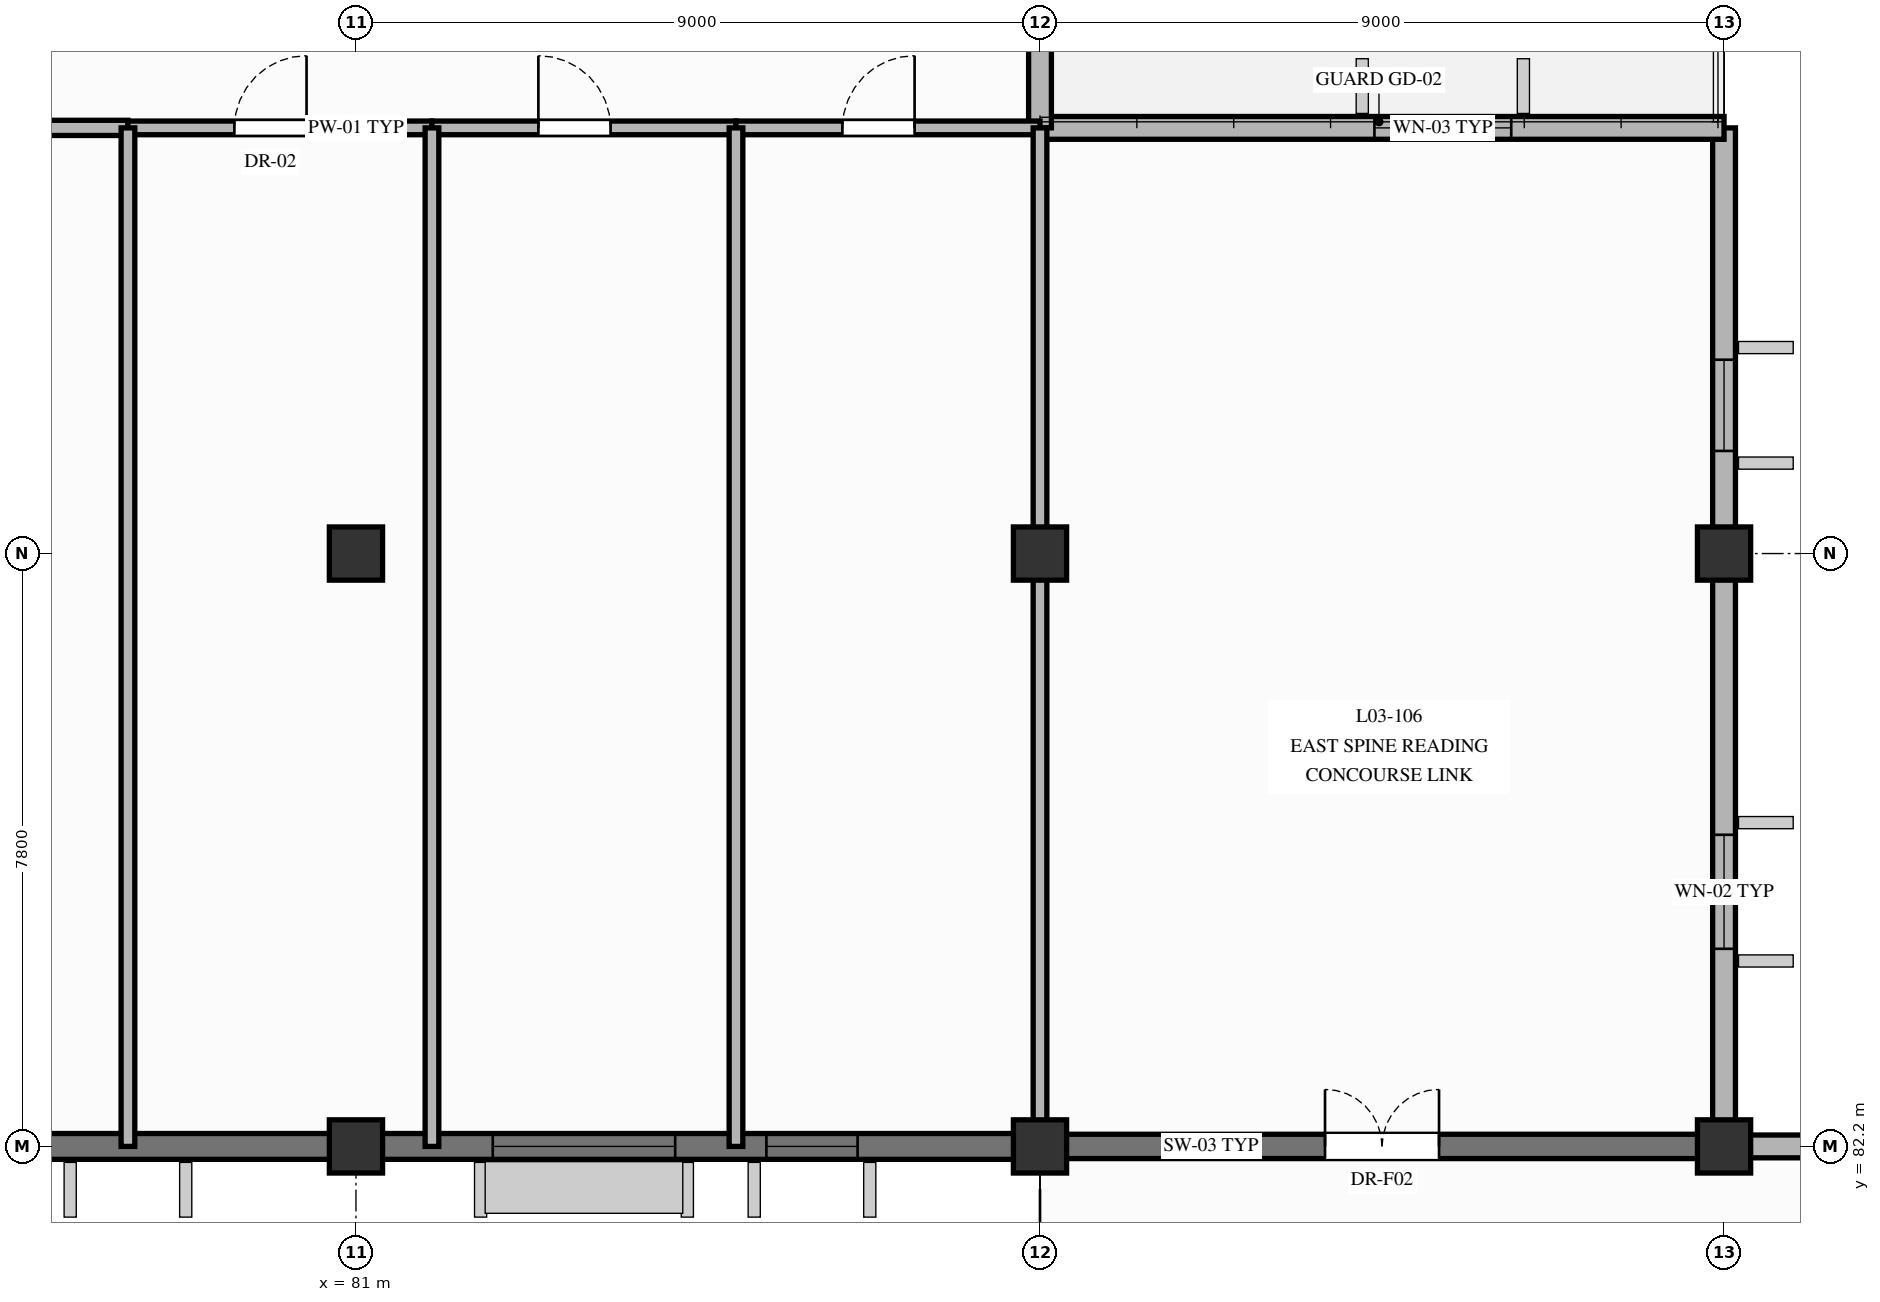
"""IFC4 building model, lengths in metres.
Left out: names, types, materials, properties, quantities, classifications, styles, units other than length and angle.
Written with IfcOpenShell. Run it as: python <this file> out.ifc"""

import sys

from ifc_helpers import new_model, si_unit, direction, frame, frame_2d, origin, origin_2d, place, context, subcontext, project, spatial, rectangle, extrude, element, fill, save


model = new_model("IFC4")
c1 = context("Model", 3, precision=1e-05, world=origin(), true_north=direction((0.0, 1.0)))
c2 = subcontext(c1, "Body", "Model", "MODEL_VIEW")
j1 = project(units=[si_unit("LENGTHUNIT", "METRE"), si_unit("PLANEANGLEUNIT", "RADIAN")], contexts=[c1])
p1 = place(None, origin())
s1 = spatial("IfcSite", under=j1, at=p1, CompositionType="ELEMENT")
p2 = place(p1, origin())
s2 = spatial("IfcBuilding", under=s1, at=p2, CompositionType="ELEMENT")
p3 = place(p2, frame((0.0, 0.0, 12.78)))
s3 = spatial("IfcBuildingStorey", under=s2, at=p3, CompositionType="ELEMENT", Elevation=12.78)
for number, where, z_axis, x_axis in (
    (1, (81.0, 82.2, 0.0), (0.0, 0.0, 1.0), (1.0, 0.0, 0.0)),
    (2, (81.0, 90.0, 0.0), (0.0, 0.0, 1.0), (1.0, 0.0, 0.0)),
    (3, (90.0, 82.2, 0.0), (0.0, 0.0, 1.0), (1.0, 0.0, 0.0)),
    (4, (90.0, 90.0, 0.0), (0.0, 0.0, 1.0), (1.0, 0.0, 0.0)),
    (5, (99.0, 82.2, 0.0), (0.0, 0.0, 1.0), (1.0, 0.0, 0.0)),
    (6, (99.0, 90.0, 0.0), (0.0, 0.0, 1.0), (1.0, 0.0, 0.0)),
):
    element("IfcColumn", number, at=place(p3, frame(where, z_axis=z_axis, x_axis=x_axis)), inside=s3, PredefinedType="COLUMN", context=c2, shape_type="SweptSolid", body=[
        extrude(rectangle(XDim=0.7, YDim=0.7, at=origin_2d()), origin(), (0.0, 0.0, 1.0), 3.74),
    ])
p4 = place(p3, frame((72.0, 82.2, 0.0), z_axis=(0.0, 0.0, 1.0), x_axis=(1.0, 0.0, 0.0)))
e7 = element("IfcWall", 7, at=p4, inside=s3, PredefinedType="SOLIDWALL", context=c2, shape_type="SweptSolid", body=[
    extrude(rectangle(XDim=9.0, YDim=0.34, at=frame_2d((4.5, 0.0))), origin(), (0.0, 0.0, 1.0), 3.42),
])
p5 = place(p4, frame((1.8, 0.0, 0.85)))
e8 = element("IfcOpeningElement", 8, at=p5, cuts=e7, PredefinedType="OPENING", context=c2, shape_type="SweptSolid", body=[
    extrude(rectangle(XDim=2.4, YDim=1.1, at=frame_2d((1.2, 0.55))), frame((0.0, 0.18, 0.0), z_axis=(0.0, -1.0, 0.0), x_axis=(1.0, 0.0, 0.0)), (0.0, 0.0, 1.0), 0.36),
])
p6 = place(p3, frame((81.0, 82.2, 0.0), z_axis=(0.0, 0.0, 1.0), x_axis=(1.0, 0.0, 0.0)))
e9 = element("IfcWall", 9, at=p6, inside=s3, PredefinedType="SOLIDWALL", context=c2, shape_type="SweptSolid", body=[
    extrude(rectangle(XDim=9.0, YDim=0.34, at=frame_2d((4.5, 0.0))), origin(), (0.0, 0.0, 1.0), 3.42),
])
p7 = place(p6, frame((1.8, 0.0, 0.85)))
e10 = element("IfcOpeningElement", 10, at=p7, cuts=e9, PredefinedType="OPENING", context=c2, shape_type="SweptSolid", body=[
    extrude(rectangle(XDim=2.4, YDim=1.1, at=frame_2d((1.2, 0.55))), frame((0.0, 0.18, 0.0), z_axis=(0.0, -1.0, 0.0), x_axis=(1.0, 0.0, 0.0)), (0.0, 0.0, 1.0), 0.36),
])
p8 = place(p6, frame((5.4, 0.0, 0.665)))
e11 = element("IfcOpeningElement", 11, at=p8, cuts=e9, PredefinedType="OPENING", context=c2, shape_type="SweptSolid", body=[
    extrude(rectangle(XDim=1.2, YDim=2.1, at=frame_2d((0.6, 1.05))), frame((0.0, 0.18, 0.0), z_axis=(0.0, -1.0, 0.0), x_axis=(1.0, 0.0, 0.0)), (0.0, 0.0, 1.0), 0.36),
])
p9 = place(p3, frame((99.0, 82.2, 0.0), z_axis=(0.0, 0.0, 1.0), x_axis=(0.0, 1.0, 0.0)))
e12 = element("IfcWall", 12, at=p9, inside=s3, PredefinedType="SOLIDWALL", context=c2, shape_type="SweptSolid", body=[
    extrude(rectangle(XDim=13.4, YDim=0.3, at=frame_2d((6.7, 0.0))), origin(), (0.0, 0.0, 1.0), 2.685),
])
p10 = place(p9, frame((2.6, 0.0, 0.465)))
e13 = element("IfcOpeningElement", 13, at=p10, cuts=e12, PredefinedType="OPENING", context=c2, shape_type="SweptSolid", body=[
    extrude(rectangle(XDim=1.5, YDim=2.1, at=frame_2d((0.75, 1.05))), frame((0.0, 0.16, 0.0), z_axis=(0.0, -1.0, 0.0), x_axis=(1.0, 0.0, 0.0)), (0.0, 0.0, 1.0), 0.32),
])
p11 = place(p9, frame((9.15, 0.0, 0.465)))
e14 = element("IfcOpeningElement", 14, at=p11, cuts=e12, PredefinedType="OPENING", context=c2, shape_type="SweptSolid", body=[
    extrude(rectangle(XDim=1.2, YDim=2.1, at=frame_2d((0.6, 1.05))), frame((0.0, 0.16, 0.0), z_axis=(0.0, -1.0, 0.0), x_axis=(1.0, 0.0, 0.0)), (0.0, 0.0, 1.0), 0.32),
])
p12 = place(p3, frame((99.0, 95.6, 0.0), z_axis=(0.0, 0.0, 1.0), x_axis=(-1.0, 0.0, 0.0)))
e15 = element("IfcWall", 15, at=p12, inside=s3, PredefinedType="SOLIDWALL", context=c2, shape_type="SweptSolid", body=[
    extrude(rectangle(XDim=9.0, YDim=0.3, at=frame_2d((4.5, 0.0))), origin(), (0.0, 0.0, 1.0), 3.42),
])
p13 = place(p12, frame((2.8, 0.0, 0.95)))
e16 = element("IfcOpeningElement", 16, at=p13, cuts=e15, PredefinedType="OPENING", context=c2, shape_type="SweptSolid", body=[
    extrude(rectangle(XDim=1.8, YDim=2.1, at=frame_2d((0.9, 1.05))), frame((0.0, 0.16, 0.0), z_axis=(0.0, -1.0, 0.0), x_axis=(1.0, 0.0, 0.0)), (0.0, 0.0, 1.0), 0.32),
])
p14 = place(p3, frame((90.0, 95.6, 0.0), z_axis=(0.0, 0.0, 1.0), x_axis=(0.0, 1.0, 0.0)))
e17 = element("IfcWall", 17, at=p14, inside=s3, PredefinedType="SOLIDWALL", context=c2, shape_type="SweptSolid", body=[
    extrude(rectangle(XDim=18.4, YDim=0.3, at=frame_2d((9.2, 0.0))), origin(), (0.0, 0.0, 1.0), 2.805),
])
p15 = place(p14, frame((4.4, 0.0, 0.0)))
e18 = element("IfcOpeningElement", 18, at=p15, cuts=e17, PredefinedType="OPENING", context=c2, shape_type="SweptSolid", body=[
    extrude(rectangle(XDim=1.6, YDim=2.25, at=frame_2d((0.8, 1.125))), frame((0.0, 0.16, 0.0), z_axis=(0.0, -1.0, 0.0), x_axis=(1.0, 0.0, 0.0)), (0.0, 0.0, 1.0), 0.32),
])
p16 = place(p14, frame((12.8, 0.0, 0.935)))
e19 = element("IfcOpeningElement", 19, at=p16, cuts=e17, PredefinedType="OPENING", context=c2, shape_type="SweptSolid", body=[
    extrude(rectangle(XDim=1.05, YDim=1.75, at=frame_2d((0.525, 0.875))), frame((0.0, 0.16, 0.0), z_axis=(0.0, -1.0, 0.0), x_axis=(1.0, 0.0, 0.0)), (0.0, 0.0, 1.0), 0.32),
])
p17 = place(p3, frame((99.0, 82.2, 0.0), z_axis=(0.0, 0.0, 1.0), x_axis=(1.0, 0.0, 0.0)))
e20 = element("IfcWall", 20, at=p17, inside=s3, PredefinedType="SOLIDWALL", context=c2, shape_type="SweptSolid", body=[
    extrude(rectangle(XDim=9.0, YDim=0.3, at=frame_2d((4.5, 0.0))), origin(), (0.0, 0.0, 1.0), 2.853),
])
p18 = place(p17, frame((2.6, 0.0, 0.633)))
e21 = element("IfcOpeningElement", 21, at=p18, cuts=e20, PredefinedType="OPENING", context=c2, shape_type="SweptSolid", body=[
    extrude(rectangle(XDim=1.8, YDim=2.1, at=frame_2d((0.9, 1.05))), frame((0.0, 0.16, 0.0), z_axis=(0.0, -1.0, 0.0), x_axis=(1.0, 0.0, 0.0)), (0.0, 0.0, 1.0), 0.32),
])
p19 = place(p3, frame((90.0, 82.2, 0.0), z_axis=(0.0, 0.0, 1.0), x_axis=(1.0, 0.0, 0.0)))
e22 = element("IfcWall", 22, at=p19, inside=s3, PredefinedType="SHEAR", context=c2, shape_type="SweptSolid", body=[
    extrude(rectangle(XDim=9.0, YDim=0.32, at=frame_2d((4.5, 0.0))), origin(), (0.0, 0.0, 1.0), 3.42),
])
p20 = place(p19, frame((3.75, 0.0, 0.0)))
e23 = element("IfcOpeningElement", 23, at=p20, cuts=e22, PredefinedType="OPENING", context=c2, shape_type="SweptSolid", body=[
    extrude(rectangle(XDim=1.5, YDim=2.2, at=frame_2d((0.75, 1.1))), frame((0.0, 0.17, 0.0), z_axis=(0.0, -1.0, 0.0), x_axis=(1.0, 0.0, 0.0)), (0.0, 0.0, 1.0), 0.34),
])
p21 = place(p3, frame((58.0, 95.6, 0.0), z_axis=(0.0, 0.0, 1.0), x_axis=(1.0, 0.0, 0.0)))
e24 = element("IfcWall", 24, at=p21, inside=s3, PredefinedType="PARTITIONING", context=c2, shape_type="SweptSolid", body=[
    extrude(rectangle(XDim=20.0, YDim=0.2, at=frame_2d((10.0, 0.0))), origin(), (0.0, 0.0, 1.0), 3.42),
])
p22 = place(p21, frame((9.4, 0.0, 0.0)))
e25 = element("IfcOpeningElement", 25, at=p22, cuts=e24, PredefinedType="OPENING", context=c2, shape_type="SweptSolid", body=[
    extrude(rectangle(XDim=1.6, YDim=2.2, at=frame_2d((0.8, 1.1))), frame((0.0, 0.11, 0.0), z_axis=(0.0, -1.0, 0.0), x_axis=(1.0, 0.0, 0.0)), (0.0, 0.0, 1.0), 0.22),
])
p23 = place(p3, frame((78.0, 95.6, 0.0), z_axis=(0.0, 0.0, 1.0), x_axis=(1.0, 0.0, 0.0)))
e26 = element("IfcWall", 26, at=p23, inside=s3, PredefinedType="PLUMBINGWALL", context=c2, shape_type="SweptSolid", body=[
    extrude(rectangle(XDim=4.0, YDim=0.18, at=frame_2d((2.0, 0.0))), origin(), (0.0, 0.0, 1.0), 3.42),
])
p24 = place(p23, frame((1.4, 0.0, 0.0)))
e27 = element("IfcOpeningElement", 27, at=p24, cuts=e26, PredefinedType="OPENING", context=c2, shape_type="SweptSolid", body=[
    extrude(rectangle(XDim=0.95, YDim=2.15, at=frame_2d((0.475, 1.075))), frame((0.0, 0.1, 0.0), z_axis=(0.0, -1.0, 0.0), x_axis=(1.0, 0.0, 0.0)), (0.0, 0.0, 1.0), 0.2),
])
p25 = place(p3, frame((78.0, 82.2, 0.0), z_axis=(0.0, 0.0, 1.0), x_axis=(0.0, 1.0, 0.0)))
e28 = element("IfcWall", 28, at=p25, inside=s3, PredefinedType="PLUMBINGWALL", context=c2, shape_type="SweptSolid", body=[
    extrude(rectangle(XDim=13.4, YDim=0.18, at=frame_2d((6.7, 0.0))), origin(), (0.0, 0.0, 1.0), 3.42),
])
p26 = place(p3, frame((82.0, 95.6, 0.0), z_axis=(0.0, 0.0, 1.0), x_axis=(1.0, 0.0, 0.0)))
e29 = element("IfcWall", 29, at=p26, inside=s3, PredefinedType="PLUMBINGWALL", context=c2, shape_type="SweptSolid", body=[
    extrude(rectangle(XDim=4.0, YDim=0.18, at=frame_2d((2.0, 0.0))), origin(), (0.0, 0.0, 1.0), 3.42),
])
p27 = place(p26, frame((1.4, 0.0, 0.0)))
e30 = element("IfcOpeningElement", 30, at=p27, cuts=e29, PredefinedType="OPENING", context=c2, shape_type="SweptSolid", body=[
    extrude(rectangle(XDim=0.95, YDim=2.15, at=frame_2d((0.475, 1.075))), frame((0.0, 0.1, 0.0), z_axis=(0.0, -1.0, 0.0), x_axis=(1.0, 0.0, 0.0)), (0.0, 0.0, 1.0), 0.2),
])
p28 = place(p3, frame((82.0, 82.2, 0.0), z_axis=(0.0, 0.0, 1.0), x_axis=(0.0, 1.0, 0.0)))
e31 = element("IfcWall", 31, at=p28, inside=s3, PredefinedType="PLUMBINGWALL", context=c2, shape_type="SweptSolid", body=[
    extrude(rectangle(XDim=13.4, YDim=0.18, at=frame_2d((6.7, 0.0))), origin(), (0.0, 0.0, 1.0), 3.42),
])
p29 = place(p3, frame((86.0, 95.6, 0.0), z_axis=(0.0, 0.0, 1.0), x_axis=(1.0, 0.0, 0.0)))
e32 = element("IfcWall", 32, at=p29, inside=s3, PredefinedType="PLUMBINGWALL", context=c2, shape_type="SweptSolid", body=[
    extrude(rectangle(XDim=4.0, YDim=0.18, at=frame_2d((2.0, 0.0))), origin(), (0.0, 0.0, 1.0), 3.42),
])
p30 = place(p29, frame((1.4, 0.0, 0.0)))
e33 = element("IfcOpeningElement", 33, at=p30, cuts=e32, PredefinedType="OPENING", context=c2, shape_type="SweptSolid", body=[
    extrude(rectangle(XDim=0.95, YDim=2.15, at=frame_2d((0.475, 1.075))), frame((0.0, 0.1, 0.0), z_axis=(0.0, -1.0, 0.0), x_axis=(1.0, 0.0, 0.0)), (0.0, 0.0, 1.0), 0.2),
])
p31 = place(p3, frame((86.0, 82.2, 0.0), z_axis=(0.0, 0.0, 1.0), x_axis=(0.0, 1.0, 0.0)))
e34 = element("IfcWall", 34, at=p31, inside=s3, PredefinedType="PLUMBINGWALL", context=c2, shape_type="SweptSolid", body=[
    extrude(rectangle(XDim=13.4, YDim=0.18, at=frame_2d((6.7, 0.0))), origin(), (0.0, 0.0, 1.0), 3.42),
])
p32 = place(p3, frame((90.0, 82.2, 0.0), z_axis=(0.0, 0.0, 1.0), x_axis=(0.0, 1.0, 0.0)))
e35 = element("IfcWall", 35, at=p32, inside=s3, PredefinedType="PLUMBINGWALL", context=c2, shape_type="SweptSolid", body=[
    extrude(rectangle(XDim=13.4, YDim=0.18, at=frame_2d((6.7, 0.0))), origin(), (0.0, 0.0, 1.0), 2.805),
])
p33 = place(p7, origin())
e36 = element("IfcWindow", 36, at=p33, inside=s3, PartitioningType="SINGLE_PANEL", PredefinedType="WINDOW", context=c2, shape_type="SweptSolid", body=[
    extrude(rectangle(XDim=2.4, YDim=1.1, at=frame_2d((1.2, 0.55))), frame((0.0, 0.03, 0.0), z_axis=(0.0, -1.0, 0.0), x_axis=(1.0, 0.0, 0.0)), (0.0, 0.0, 1.0), 0.06),
])
fill(e10, e36)
p34 = place(p8, origin())
e37 = element("IfcWindow", 37, at=p34, inside=s3, PartitioningType="SINGLE_PANEL", PredefinedType="WINDOW", context=c2, shape_type="SweptSolid", body=[
    extrude(rectangle(XDim=1.2, YDim=2.1, at=frame_2d((0.6, 1.05))), frame((0.0, 0.03, 0.0), z_axis=(0.0, -1.0, 0.0), x_axis=(1.0, 0.0, 0.0)), (0.0, 0.0, 1.0), 0.06),
])
fill(e11, e37)
p35 = place(p10, origin())
e38 = element("IfcWindow", 38, at=p35, inside=s3, PartitioningType="SINGLE_PANEL", PredefinedType="WINDOW", context=c2, shape_type="SweptSolid", body=[
    extrude(rectangle(XDim=1.5, YDim=2.1, at=frame_2d((0.75, 1.05))), frame((0.0, 0.03, 0.0), z_axis=(0.0, -1.0, 0.0), x_axis=(1.0, 0.0, 0.0)), (0.0, 0.0, 1.0), 0.06),
])
fill(e13, e38)
p36 = place(p11, origin())
e39 = element("IfcWindow", 39, at=p36, inside=s3, PartitioningType="SINGLE_PANEL", PredefinedType="WINDOW", context=c2, shape_type="SweptSolid", body=[
    extrude(rectangle(XDim=1.2, YDim=2.1, at=frame_2d((0.6, 1.05))), frame((0.0, 0.03, 0.0), z_axis=(0.0, -1.0, 0.0), x_axis=(1.0, 0.0, 0.0)), (0.0, 0.0, 1.0), 0.06),
])
fill(e14, e39)
p37 = place(p13, origin())
e40 = element("IfcWindow", 40, at=p37, inside=s3, PartitioningType="SINGLE_PANEL", PredefinedType="WINDOW", context=c2, shape_type="SweptSolid", body=[
    extrude(rectangle(XDim=1.8, YDim=2.1, at=frame_2d((0.9, 1.05))), frame((0.0, 0.03, 0.0), z_axis=(0.0, -1.0, 0.0), x_axis=(1.0, 0.0, 0.0)), (0.0, 0.0, 1.0), 0.06),
])
fill(e16, e40)
p38 = place(p20, origin())
e41 = element("IfcDoor", 41, at=p38, inside=s3, OperationType="DOUBLE_DOOR_SINGLE_SWING", PredefinedType="DOOR", context=c2, shape_type="SweptSolid", body=[
    extrude(rectangle(XDim=1.5, YDim=2.2, at=frame_2d((0.75, 1.1))), frame((0.0, 0.025, 0.0), z_axis=(0.0, -1.0, 0.0), x_axis=(1.0, 0.0, 0.0)), (0.0, 0.0, 1.0), 0.05),
])
fill(e23, e41)
p39 = place(p24, origin())
e42 = element("IfcDoor", 42, at=p39, inside=s3, OperationType="SINGLE_SWING_RIGHT", PredefinedType="DOOR", context=c2, shape_type="SweptSolid", body=[
    extrude(rectangle(XDim=0.95, YDim=2.15, at=frame_2d((0.475, 1.075))), frame((0.0, 0.025, 0.0), z_axis=(0.0, -1.0, 0.0), x_axis=(1.0, 0.0, 0.0)), (0.0, 0.0, 1.0), 0.05),
])
fill(e27, e42)
p40 = place(p27, origin())
e43 = element("IfcDoor", 43, at=p40, inside=s3, OperationType="SINGLE_SWING_LEFT", PredefinedType="DOOR", context=c2, shape_type="SweptSolid", body=[
    extrude(rectangle(XDim=0.95, YDim=2.15, at=frame_2d((0.475, 1.075))), frame((0.0, 0.025, 0.0), z_axis=(0.0, -1.0, 0.0), x_axis=(1.0, 0.0, 0.0)), (0.0, 0.0, 1.0), 0.05),
])
fill(e30, e43)
p41 = place(p30, origin())
e44 = element("IfcDoor", 44, at=p41, inside=s3, OperationType="SINGLE_SWING_RIGHT", PredefinedType="DOOR", context=c2, shape_type="SweptSolid", body=[
    extrude(rectangle(XDim=0.95, YDim=2.15, at=frame_2d((0.475, 1.075))), frame((0.0, 0.025, 0.0), z_axis=(0.0, -1.0, 0.0), x_axis=(1.0, 0.0, 0.0)), (0.0, 0.0, 1.0), 0.05),
])
fill(e33, e44)
save(model, sys.argv[1])
